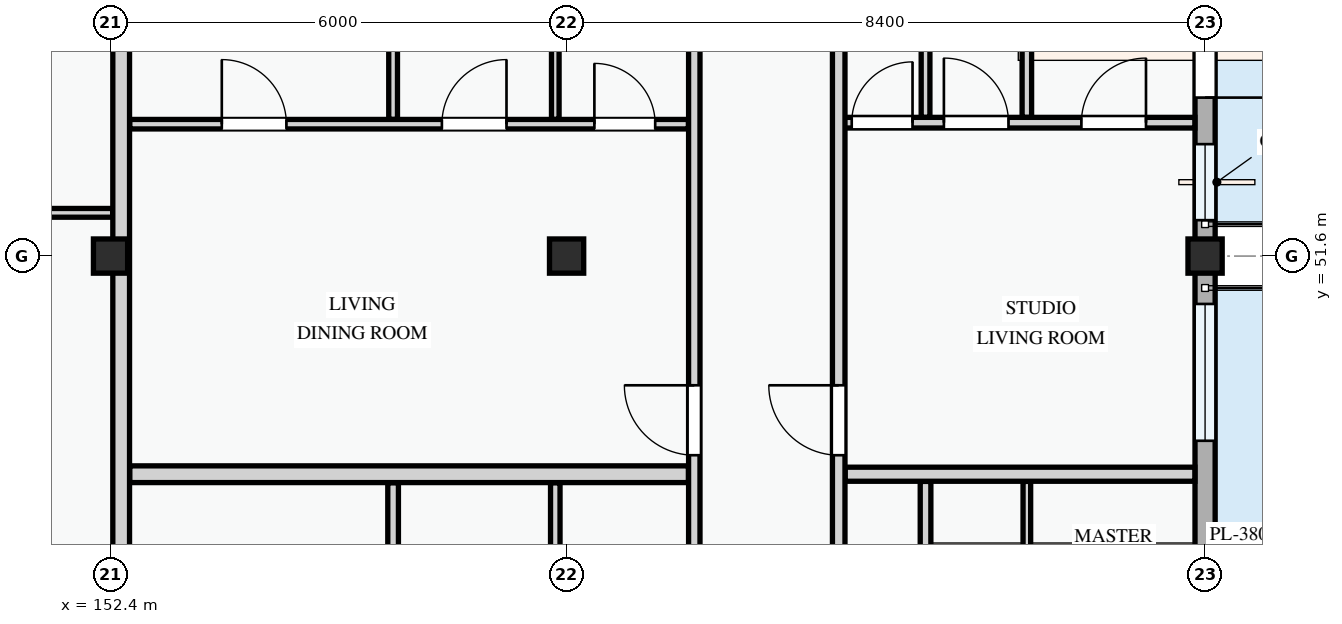
"""IFC4 building model, lengths in metres.
Left out: names, types, materials, properties, quantities, classifications, styles, units other than length and angle.
Written with IfcOpenShell. Run it as: python <this file> out.ifc"""

import sys

from ifc_helpers import new_model, si_unit, direction, frame, frame_2d, origin, origin_2d, place, context, subcontext, project, spatial, rectangle, extrude, element, fill, save


model = new_model("IFC4")
c1 = context("Model", 3, precision=1e-05, world=origin(), true_north=direction((0.0, 1.0)))
c2 = subcontext(c1, "Body", "Model", "MODEL_VIEW")
j1 = project(units=[si_unit("LENGTHUNIT", "METRE"), si_unit("PLANEANGLEUNIT", "RADIAN")], contexts=[c1])
p1 = place(None, origin())
s1 = spatial("IfcSite", under=j1, at=p1, CompositionType="ELEMENT")
p2 = place(p1, origin())
s2 = spatial("IfcBuilding", under=s1, at=p2, CompositionType="ELEMENT")
p3 = place(p2, frame((0.0, 0.0, 24.6)))
s3 = spatial("IfcBuildingStorey", under=s2, at=p3, CompositionType="ELEMENT", Elevation=24.6)
for number, where, z_axis, x_axis in (
    (1, (152.4, 51.6, 0.0), (0.0, 0.0, 1.0), (1.0, 0.0, 0.0)),
    (2, (158.4, 51.6, 0.0), (0.0, 0.0, 1.0), (1.0, 0.0, 0.0)),
    (3, (166.8, 51.6, 0.0), (0.0, 0.0, 1.0), (1.0, 0.0, 0.0)),
):
    element("IfcColumn", number, at=place(p3, frame(where, z_axis=z_axis, x_axis=x_axis)), inside=s3, PredefinedType="COLUMN", context=c2, shape_type="SweptSolid", body=[
        extrude(rectangle(XDim=0.45, YDim=0.45, at=origin_2d()), origin(), (0.0, 0.0, 1.0), 3.3),
    ])
p4 = place(p3, frame((166.8, 43.2, 0.0), z_axis=(0.0, 0.0, 1.0), x_axis=(0.0, 1.0, 0.0)))
e4 = element("IfcWall", 4, at=p4, inside=s3, PredefinedType="STANDARD", context=c2, shape_type="SweptSolid", body=[
    extrude(rectangle(XDim=8.4, YDim=0.265, at=frame_2d((4.2, 0.0))), origin(), (0.0, 0.0, 1.0), 2.425),
])
p5 = place(p4, frame((0.62, 0.0, 0.0)))
e5 = element("IfcOpeningElement", 5, at=p5, cuts=e4, PredefinedType="OPENING", context=c2, shape_type="SweptSolid", body=[
    extrude(rectangle(XDim=1.6, YDim=2.2, at=frame_2d((0.8, 1.1))), frame((0.0, 0.143, 0.0), z_axis=(0.0, -1.0, 0.0), x_axis=(1.0, 0.0, 0.0)), (0.0, 0.0, 1.0), 0.285),
])
p6 = place(p4, frame((3.35, 0.0, 0.78)))
e6 = element("IfcOpeningElement", 6, at=p6, cuts=e4, PredefinedType="OPENING", context=c2, shape_type="SweptSolid", body=[
    extrude(rectangle(XDim=1.1, YDim=1.3, at=frame_2d((0.55, 0.65))), frame((0.0, 0.143, 0.0), z_axis=(0.0, -1.0, 0.0), x_axis=(1.0, 0.0, 0.0)), (0.0, 0.0, 1.0), 0.285),
])
p7 = place(p4, frame((5.97, 0.0, 0.78)))
e7 = element("IfcOpeningElement", 7, at=p7, cuts=e4, PredefinedType="OPENING", context=c2, shape_type="SweptSolid", body=[
    extrude(rectangle(XDim=1.8, YDim=1.5, at=frame_2d((0.9, 0.75))), frame((0.0, 0.143, 0.0), z_axis=(0.0, -1.0, 0.0), x_axis=(1.0, 0.0, 0.0)), (0.0, 0.0, 1.0), 0.285),
])
p8 = place(p3, frame((166.8, 51.6, 0.0), z_axis=(0.0, 0.0, 1.0), x_axis=(0.0, 1.0, 0.0)))
e8 = element("IfcWall", 8, at=p8, inside=s3, PredefinedType="STANDARD", context=c2, shape_type="SweptSolid", body=[
    extrude(rectangle(XDim=6.0, YDim=0.265, at=frame_2d((3.0, 0.0))), origin(), (0.0, 0.0, 1.0), 2.575),
])
p9 = place(p8, frame((2.085, 0.0, 0.0)))
e9 = element("IfcOpeningElement", 9, at=p9, cuts=e8, PredefinedType="OPENING", context=c2, shape_type="SweptSolid", body=[
    extrude(rectangle(XDim=1.05, YDim=2.15, at=frame_2d((0.525, 1.075))), frame((0.0, 0.143, 0.0), z_axis=(0.0, -1.0, 0.0), x_axis=(1.0, 0.0, 0.0)), (0.0, 0.0, 1.0), 0.285),
])
p10 = place(p8, frame((0.472, 0.0, 0.78)))
e10 = element("IfcOpeningElement", 10, at=p10, cuts=e8, PredefinedType="OPENING", context=c2, shape_type="SweptSolid", body=[
    extrude(rectangle(XDim=1.0, YDim=1.25, at=frame_2d((0.5, 0.625))), frame((0.0, 0.143, 0.0), z_axis=(0.0, -1.0, 0.0), x_axis=(1.0, 0.0, 0.0)), (0.0, 0.0, 1.0), 0.285),
])
p11 = place(p8, frame((3.897, 0.0, 0.78)))
e11 = element("IfcOpeningElement", 11, at=p11, cuts=e8, PredefinedType="OPENING", context=c2, shape_type="SweptSolid", body=[
    extrude(rectangle(XDim=1.2, YDim=1.35, at=frame_2d((0.6, 0.675))), frame((0.0, 0.143, 0.0), z_axis=(0.0, -1.0, 0.0), x_axis=(1.0, 0.0, 0.0)), (0.0, 0.0, 1.0), 0.285),
])
p12 = place(p3, frame((156.118, 41.447, 0.0), z_axis=(0.0, 0.0, 1.0), x_axis=(0.0, 1.0, 0.0)))
e12 = element("IfcWall", 12, at=p12, inside=s3, PredefinedType="PARTITIONING", context=c2, shape_type="SweptSolid", body=[
    extrude(rectangle(XDim=7.171, YDim=0.14, at=frame_2d((3.585, 0.0))), origin(), (0.0, 0.0, 1.0), 3.0),
])
p13 = place(p3, frame((158.251, 41.447, 0.0), z_axis=(0.0, 0.0, 1.0), x_axis=(0.0, 1.0, 0.0)))
e13 = element("IfcWall", 13, at=p13, inside=s3, PredefinedType="PARTITIONING", context=c2, shape_type="SweptSolid", body=[
    extrude(rectangle(XDim=7.171, YDim=0.125, at=frame_2d((3.585, 0.0))), origin(), (0.0, 0.0, 1.0), 2.425),
])
p14 = place(p3, frame((164.455, 41.525, 0.0), z_axis=(0.0, 0.0, 1.0), x_axis=(0.0, 1.0, 0.0)))
e14 = element("IfcWall", 14, at=p14, inside=s3, PredefinedType="PARTITIONING", context=c2, shape_type="SweptSolid", body=[
    extrude(rectangle(XDim=7.11, YDim=0.1, at=frame_2d((3.555, 0.0))), origin(), (0.0, 0.0, 1.0), 3.0),
])
p15 = place(p3, frame((163.122, 41.525, 0.0), z_axis=(0.0, 0.0, 1.0), x_axis=(0.0, 1.0, 0.0)))
e15 = element("IfcWall", 15, at=p15, inside=s3, PredefinedType="PARTITIONING", context=c2, shape_type="SweptSolid", body=[
    extrude(rectangle(XDim=7.11, YDim=0.14, at=frame_2d((3.555, 0.0))), origin(), (0.0, 0.0, 1.0), 3.0),
])
p16 = place(p3, frame((152.652, 53.335, 0.0), z_axis=(0.0, 0.0, 1.0), x_axis=(1.0, 0.0, 0.0)))
e16 = element("IfcWall", 16, at=p16, inside=s3, PredefinedType="PARTITIONING", context=c2, shape_type="SweptSolid", body=[
    extrude(rectangle(XDim=7.351, YDim=0.125, at=frame_2d((3.675, 0.0))), origin(), (0.0, 0.0, 1.0), 3.0),
])
p17 = place(p16, frame((1.212, 0.0, 0.0)))
e17 = element("IfcOpeningElement", 17, at=p17, cuts=e16, PredefinedType="OPENING", context=c2, shape_type="SweptSolid", body=[
    extrude(rectangle(XDim=0.85, YDim=2.1, at=frame_2d((0.425, 1.05))), frame((0.0, 0.073, 0.0), z_axis=(0.0, -1.0, 0.0), x_axis=(1.0, 0.0, 0.0)), (0.0, 0.0, 1.0), 0.145),
])
p18 = place(p16, frame((4.107, 0.0, 0.0)))
e18 = element("IfcOpeningElement", 18, at=p18, cuts=e16, PredefinedType="OPENING", context=c2, shape_type="SweptSolid", body=[
    extrude(rectangle(XDim=0.85, YDim=2.1, at=frame_2d((0.425, 1.05))), frame((0.0, 0.073, 0.0), z_axis=(0.0, -1.0, 0.0), x_axis=(1.0, 0.0, 0.0)), (0.0, 0.0, 1.0), 0.145),
])
p19 = place(p16, frame((6.114, 0.0, 0.0)))
e19 = element("IfcOpeningElement", 19, at=p19, cuts=e16, PredefinedType="OPENING", context=c2, shape_type="SweptSolid", body=[
    extrude(rectangle(XDim=0.8, YDim=2.1, at=frame_2d((0.4, 1.05))), frame((0.0, 0.073, 0.0), z_axis=(0.0, -1.0, 0.0), x_axis=(1.0, 0.0, 0.0)), (0.0, 0.0, 1.0), 0.145),
])
p20 = place(p3, frame((156.118, 53.399, 0.0), z_axis=(0.0, 0.0, 1.0), x_axis=(0.0, 1.0, 0.0)))
e20 = element("IfcWall", 20, at=p20, inside=s3, PredefinedType="PARTITIONING", context=c2, shape_type="SweptSolid", body=[
    extrude(rectangle(XDim=4.239, YDim=0.115, at=frame_2d((2.119, 0.0))), origin(), (0.0, 0.0, 1.0), 3.0),
])
p21 = place(p3, frame((158.251, 53.399, 0.0), z_axis=(0.0, 0.0, 1.0), x_axis=(0.0, 1.0, 0.0)))
e21 = element("IfcWall", 21, at=p21, inside=s3, PredefinedType="PARTITIONING", context=c2, shape_type="SweptSolid", body=[
    extrude(rectangle(XDim=4.239, YDim=0.1, at=frame_2d((2.119, 0.0))), origin(), (0.0, 0.0, 1.0), 2.575),
])
p22 = place(p3, frame((161.98, 53.355, 0.0), z_axis=(0.0, 0.0, 1.0), x_axis=(1.0, 0.0, 0.0)))
e22 = element("IfcWall", 22, at=p22, inside=s3, PredefinedType="PARTITIONING", context=c2, shape_type="SweptSolid", body=[
    extrude(rectangle(XDim=4.686, YDim=0.14, at=frame_2d((2.343, 0.0))), origin(), (0.0, 0.0, 1.0), 3.0),
])
p23 = place(p22, frame((0.171, 0.0, 0.0)))
e23 = element("IfcOpeningElement", 23, at=p23, cuts=e22, PredefinedType="OPENING", context=c2, shape_type="SweptSolid", body=[
    extrude(rectangle(XDim=0.8, YDim=2.1, at=frame_2d((0.4, 1.05))), frame((0.0, 0.08, 0.0), z_axis=(0.0, -1.0, 0.0), x_axis=(1.0, 0.0, 0.0)), (0.0, 0.0, 1.0), 0.16),
])
p24 = place(p22, frame((1.384, 0.0, 0.0)))
e24 = element("IfcOpeningElement", 24, at=p24, cuts=e22, PredefinedType="OPENING", context=c2, shape_type="SweptSolid", body=[
    extrude(rectangle(XDim=0.85, YDim=2.1, at=frame_2d((0.425, 1.05))), frame((0.0, 0.08, 0.0), z_axis=(0.0, -1.0, 0.0), x_axis=(1.0, 0.0, 0.0)), (0.0, 0.0, 1.0), 0.16),
])
p25 = place(p22, frame((3.193, 0.0, 0.0)))
e25 = element("IfcOpeningElement", 25, at=p25, cuts=e22, PredefinedType="OPENING", context=c2, shape_type="SweptSolid", body=[
    extrude(rectangle(XDim=0.85, YDim=2.1, at=frame_2d((0.425, 1.05))), frame((0.0, 0.08, 0.0), z_axis=(0.0, -1.0, 0.0), x_axis=(1.0, 0.0, 0.0)), (0.0, 0.0, 1.0), 0.16),
])
p26 = place(p3, frame((164.455, 53.427, 0.0), z_axis=(0.0, 0.0, 1.0), x_axis=(0.0, 1.0, 0.0)))
e26 = element("IfcWall", 26, at=p26, inside=s3, PredefinedType="PARTITIONING", context=c2, shape_type="SweptSolid", body=[
    extrude(rectangle(XDim=4.201, YDim=0.125, at=frame_2d((2.101, 0.0))), origin(), (0.0, 0.0, 1.0), 3.0),
])
p27 = place(p3, frame((163.122, 53.427, 0.0), z_axis=(0.0, 0.0, 1.0), x_axis=(0.0, 1.0, 0.0)))
e27 = element("IfcWall", 27, at=p27, inside=s3, PredefinedType="PARTITIONING", context=c2, shape_type="SweptSolid", body=[
    extrude(rectangle(XDim=4.201, YDim=0.115, at=frame_2d((2.101, 0.0))), origin(), (0.0, 0.0, 1.0), 3.0),
])
p28 = place(p3, frame((152.652, 48.73, 0.0), z_axis=(0.0, 0.0, 1.0), x_axis=(1.0, 0.0, 0.0)))
e28 = element("IfcWall", 28, at=p28, inside=s3, PredefinedType="PARTITIONING", context=c2, shape_type="SweptSolid", body=[
    extrude(rectangle(XDim=7.351, YDim=0.22, at=frame_2d((3.675, 0.0))), origin(), (0.0, 0.0, 1.0), 3.0),
])
p29 = place(p3, frame((162.064, 48.73, 0.0), z_axis=(0.0, 0.0, 1.0), x_axis=(1.0, 0.0, 0.0)))
e29 = element("IfcWall", 29, at=p29, inside=s3, PredefinedType="PARTITIONING", context=c2, shape_type="SweptSolid", body=[
    extrude(rectangle(XDim=4.601, YDim=0.185, at=frame_2d((2.301, 0.0))), origin(), (0.0, 0.0, 1.0), 3.0),
])
p30 = place(p3, frame((160.08, 37.334, 0.0), z_axis=(0.0, 0.0, 1.0), x_axis=(0.0, 1.0, 0.0)))
e30 = element("IfcWall", 30, at=p30, inside=s3, PredefinedType="PARTITIONING", context=c2, shape_type="SweptSolid", body=[
    extrude(rectangle(XDim=20.406, YDim=0.15, at=frame_2d((10.203, 0.0))), origin(), (0.0, 0.0, 1.0), 3.0),
])
p31 = place(p30, frame((2.349, 0.0, 0.0)))
e31 = element("IfcOpeningElement", 31, at=p31, cuts=e30, PredefinedType="OPENING", context=c2, shape_type="SweptSolid", body=[
    extrude(rectangle(XDim=0.92, YDim=2.1, at=frame_2d((0.46, 1.05))), frame((0.0, 0.085, 0.0), z_axis=(0.0, -1.0, 0.0), x_axis=(1.0, 0.0, 0.0)), (0.0, 0.0, 1.0), 0.17),
])
p32 = place(p30, frame((11.646, 0.0, 0.0)))
e32 = element("IfcOpeningElement", 32, at=p32, cuts=e30, PredefinedType="OPENING", context=c2, shape_type="SweptSolid", body=[
    extrude(rectangle(XDim=0.92, YDim=2.1, at=frame_2d((0.46, 1.05))), frame((0.0, 0.085, 0.0), z_axis=(0.0, -1.0, 0.0), x_axis=(1.0, 0.0, 0.0)), (0.0, 0.0, 1.0), 0.17),
])
p33 = place(p3, frame((161.98, 37.334, 0.0), z_axis=(0.0, 0.0, 1.0), x_axis=(0.0, 1.0, 0.0)))
e33 = element("IfcWall", 33, at=p33, inside=s3, PredefinedType="PARTITIONING", context=c2, shape_type="SweptSolid", body=[
    extrude(rectangle(XDim=20.406, YDim=0.165, at=frame_2d((10.203, 0.0))), origin(), (0.0, 0.0, 1.0), 3.0),
])
p34 = place(p33, frame((2.406, 0.0, 0.0)))
e34 = element("IfcOpeningElement", 34, at=p34, cuts=e33, PredefinedType="OPENING", context=c2, shape_type="SweptSolid", body=[
    extrude(rectangle(XDim=0.92, YDim=2.1, at=frame_2d((0.46, 1.05))), frame((0.0, 0.093, 0.0), z_axis=(0.0, -1.0, 0.0), x_axis=(1.0, 0.0, 0.0)), (0.0, 0.0, 1.0), 0.185),
])
p35 = place(p33, frame((11.646, 0.0, 0.0)))
e35 = element("IfcOpeningElement", 35, at=p35, cuts=e33, PredefinedType="OPENING", context=c2, shape_type="SweptSolid", body=[
    extrude(rectangle(XDim=0.92, YDim=2.1, at=frame_2d((0.46, 1.05))), frame((0.0, 0.093, 0.0), z_axis=(0.0, -1.0, 0.0), x_axis=(1.0, 0.0, 0.0)), (0.0, 0.0, 1.0), 0.185),
])
p36 = place(p3, frame((145.865, 52.169, 0.0), z_axis=(0.0, 0.0, 1.0), x_axis=(1.0, 0.0, 0.0)))
e36 = element("IfcWall", 36, at=p36, inside=s3, PredefinedType="PARTITIONING", context=c2, shape_type="SweptSolid", body=[
    extrude(rectangle(XDim=6.563, YDim=0.115, at=frame_2d((3.282, 0.0))), origin(), (0.0, 0.0, 1.0), 3.0),
])
p37 = place(p3, frame((152.54, 43.26, 0.0), z_axis=(0.0, 0.0, 1.0), x_axis=(0.0, 1.0, 0.0)))
e37 = element("IfcWall", 37, at=p37, inside=s3, PredefinedType="PARTITIONING", context=c2, shape_type="SweptSolid", body=[
    extrude(rectangle(XDim=18.464, YDim=0.22, at=frame_2d((9.232, 0.0))), origin(), (0.0, 0.0, 1.0), 2.425),
])
p38 = place(p7, origin())
e38 = element("IfcWindow", 38, at=p38, inside=s3, PartitioningType="DOUBLE_PANEL_VERTICAL", PredefinedType="WINDOW", context=c2, shape_type="SweptSolid", body=[
    extrude(rectangle(XDim=1.8, YDim=1.5, at=frame_2d((0.9, 0.75))), frame((0.0, 0.03, 0.0), z_axis=(0.0, -1.0, 0.0), x_axis=(1.0, 0.0, 0.0)), (0.0, 0.0, 1.0), 0.06),
])
fill(e7, e38)
p39 = place(p9, frame((1.05, 0.0, 0.0), z_axis=(0.0, 0.0, 1.0), x_axis=(-1.0, 0.0, 0.0)))
e39 = element("IfcDoor", 39, at=p39, inside=s3, OperationType="SINGLE_SWING_RIGHT", PredefinedType="DOOR", context=c2, shape_type="SweptSolid", body=[
    extrude(rectangle(XDim=1.05, YDim=2.15, at=frame_2d((0.525, 1.075))), frame((0.0, 0.025, 0.0), z_axis=(0.0, -1.0, 0.0), x_axis=(1.0, 0.0, 0.0)), (0.0, 0.0, 1.0), 0.05),
])
fill(e9, e39)
p40 = place(p10, origin())
e40 = element("IfcWindow", 40, at=p40, inside=s3, PartitioningType="SINGLE_PANEL", PredefinedType="WINDOW", context=c2, shape_type="SweptSolid", body=[
    extrude(rectangle(XDim=1.0, YDim=1.25, at=frame_2d((0.5, 0.625))), frame((0.0, 0.03, 0.0), z_axis=(0.0, -1.0, 0.0), x_axis=(1.0, 0.0, 0.0)), (0.0, 0.0, 1.0), 0.06),
])
fill(e10, e40)
p41 = place(p17, origin())
e41 = element("IfcDoor", 41, at=p41, inside=s3, OperationType="SINGLE_SWING_LEFT", PredefinedType="DOOR", context=c2, shape_type="SweptSolid", body=[
    extrude(rectangle(XDim=0.85, YDim=2.1, at=frame_2d((0.425, 1.05))), frame((0.0, 0.025, 0.0), z_axis=(0.0, -1.0, 0.0), x_axis=(1.0, 0.0, 0.0)), (0.0, 0.0, 1.0), 0.05),
])
fill(e17, e41)
p42 = place(p18, origin())
e42 = element("IfcDoor", 42, at=p42, inside=s3, OperationType="SINGLE_SWING_RIGHT", PredefinedType="DOOR", context=c2, shape_type="SweptSolid", body=[
    extrude(rectangle(XDim=0.85, YDim=2.1, at=frame_2d((0.425, 1.05))), frame((0.0, 0.025, 0.0), z_axis=(0.0, -1.0, 0.0), x_axis=(1.0, 0.0, 0.0)), (0.0, 0.0, 1.0), 0.05),
])
fill(e18, e42)
p43 = place(p19, origin())
e43 = element("IfcDoor", 43, at=p43, inside=s3, OperationType="SINGLE_SWING_LEFT", PredefinedType="DOOR", context=c2, shape_type="SweptSolid", body=[
    extrude(rectangle(XDim=0.8, YDim=2.1, at=frame_2d((0.4, 1.05))), frame((0.0, 0.025, 0.0), z_axis=(0.0, -1.0, 0.0), x_axis=(1.0, 0.0, 0.0)), (0.0, 0.0, 1.0), 0.05),
])
fill(e19, e43)
p44 = place(p23, origin())
e44 = element("IfcDoor", 44, at=p44, inside=s3, OperationType="SINGLE_SWING_RIGHT", PredefinedType="DOOR", context=c2, shape_type="SweptSolid", body=[
    extrude(rectangle(XDim=0.8, YDim=2.1, at=frame_2d((0.4, 1.05))), frame((0.0, 0.025, 0.0), z_axis=(0.0, -1.0, 0.0), x_axis=(1.0, 0.0, 0.0)), (0.0, 0.0, 1.0), 0.05),
])
fill(e23, e44)
p45 = place(p24, origin())
e45 = element("IfcDoor", 45, at=p45, inside=s3, OperationType="SINGLE_SWING_LEFT", PredefinedType="DOOR", context=c2, shape_type="SweptSolid", body=[
    extrude(rectangle(XDim=0.85, YDim=2.1, at=frame_2d((0.425, 1.05))), frame((0.0, 0.025, 0.0), z_axis=(0.0, -1.0, 0.0), x_axis=(1.0, 0.0, 0.0)), (0.0, 0.0, 1.0), 0.05),
])
fill(e24, e45)
p46 = place(p25, origin())
e46 = element("IfcDoor", 46, at=p46, inside=s3, OperationType="SINGLE_SWING_RIGHT", PredefinedType="DOOR", context=c2, shape_type="SweptSolid", body=[
    extrude(rectangle(XDim=0.85, YDim=2.1, at=frame_2d((0.425, 1.05))), frame((0.0, 0.025, 0.0), z_axis=(0.0, -1.0, 0.0), x_axis=(1.0, 0.0, 0.0)), (0.0, 0.0, 1.0), 0.05),
])
fill(e25, e46)
p47 = place(p32, origin())
e47 = element("IfcDoor", 47, at=p47, inside=s3, OperationType="SINGLE_SWING_RIGHT", PredefinedType="DOOR", context=c2, shape_type="SweptSolid", body=[
    extrude(rectangle(XDim=0.92, YDim=2.1, at=frame_2d((0.46, 1.05))), frame((0.0, 0.025, 0.0), z_axis=(0.0, -1.0, 0.0), x_axis=(1.0, 0.0, 0.0)), (0.0, 0.0, 1.0), 0.05),
])
fill(e32, e47)
p48 = place(p35, origin())
e48 = element("IfcDoor", 48, at=p48, inside=s3, OperationType="SINGLE_SWING_RIGHT", PredefinedType="DOOR", context=c2, shape_type="SweptSolid", body=[
    extrude(rectangle(XDim=0.92, YDim=2.1, at=frame_2d((0.46, 1.05))), frame((0.0, 0.025, 0.0), z_axis=(0.0, -1.0, 0.0), x_axis=(1.0, 0.0, 0.0)), (0.0, 0.0, 1.0), 0.05),
])
fill(e35, e48)
save(model, sys.argv[1])
